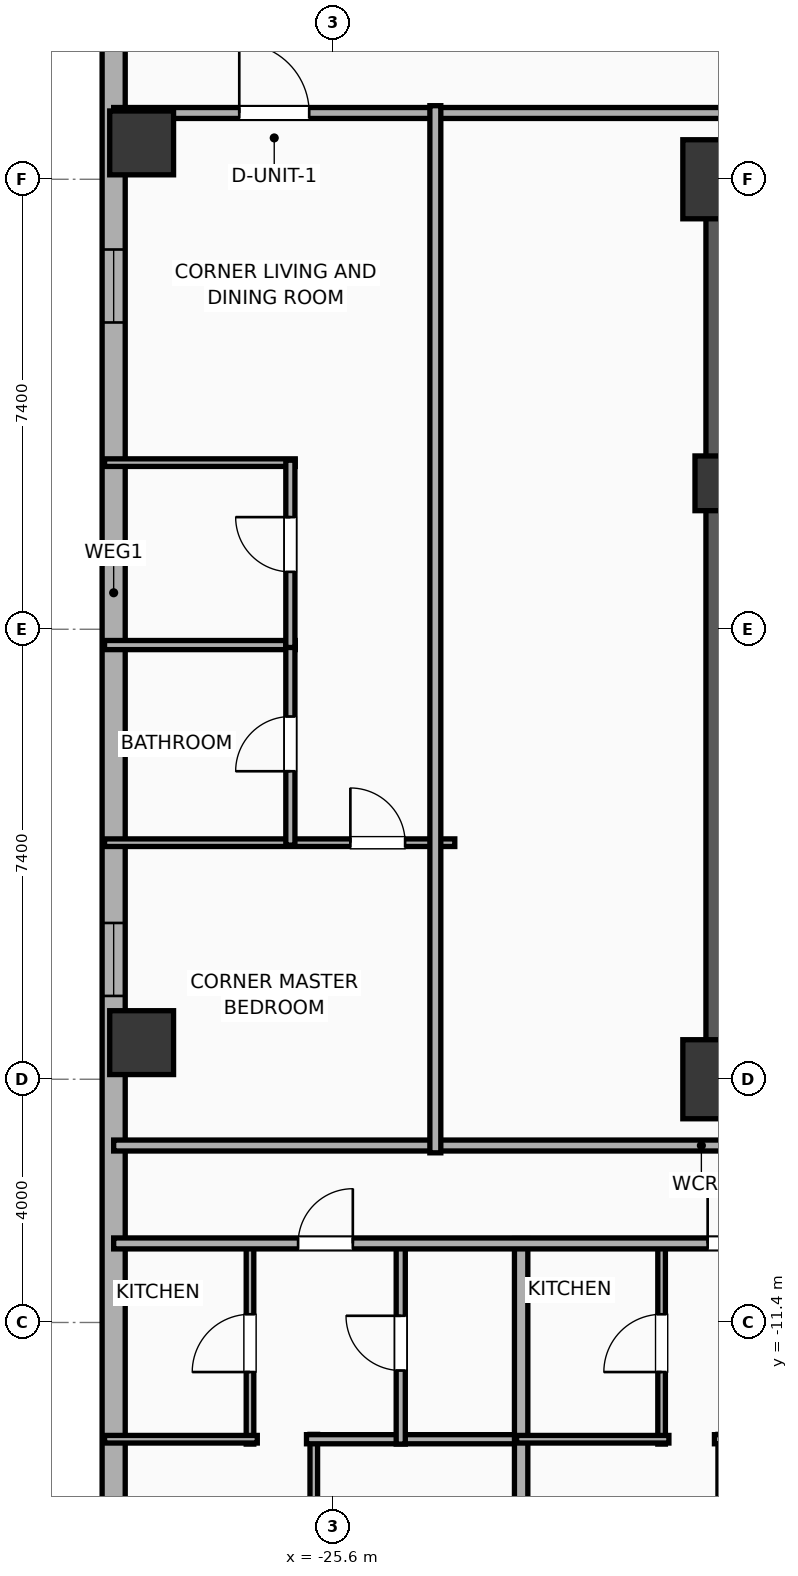
"""IFC4 building model, lengths in metres.
Left out: names, types, materials, properties, quantities, classifications, styles, units other than length and angle.
Written with IfcOpenShell. Run it as: python <this file> out.ifc"""

import sys

from ifc_helpers import new_model, si_unit, direction, frame, frame_2d, origin, origin_2d, place, context, subcontext, project, spatial, rectangle, hollow_rectangle, extrude, element, fill, save


model = new_model("IFC4")
c1 = context("Model", 3, precision=1e-05, world=origin(), true_north=direction((0.0, 1.0)))
c2 = subcontext(c1, "Body", "Model", "MODEL_VIEW")
j1 = project(units=[si_unit("LENGTHUNIT", "METRE"), si_unit("PLANEANGLEUNIT", "RADIAN")], contexts=[c1])
p1 = place(None, origin())
s1 = spatial("IfcSite", under=j1, at=p1, CompositionType="ELEMENT")
p2 = place(p1, origin())
s2 = spatial("IfcBuilding", under=s1, at=p2, CompositionType="ELEMENT")
p3 = place(p2, frame((0.0, 0.0, 97.5)))
s3 = spatial("IfcBuildingStorey", under=s2, at=p3, CompositionType="ELEMENT", Elevation=97.5)
p4 = place(p3, frame((-19.2, -7.4, 0.0), z_axis=(0.0, 0.0, 1.0), x_axis=(1.0, 0.0, 0.0)))
e1 = element("IfcColumn", 1, at=p4, inside=s3, PredefinedType="COLUMN", context=c2, shape_type="SweptSolid", body=[
    extrude(rectangle(XDim=1.3, YDim=1.3, at=origin_2d()), origin(), (0.0, 0.0, 1.0), 3.9),
])
p5 = place(p3, frame((-19.2, 2.4, 0.0), z_axis=(0.0, 0.0, 1.0), x_axis=(1.0, 0.0, 0.0)))
e2 = element("IfcColumn", 2, at=p5, inside=s3, PredefinedType="COLUMN", context=c2, shape_type="SweptSolid", body=[
    extrude(rectangle(XDim=0.9, YDim=0.9, at=origin_2d()), origin(), (0.0, 0.0, 1.0), 3.9),
])
p6 = place(p3, frame((-19.2, 7.4, 0.0), z_axis=(0.0, 0.0, 1.0), x_axis=(1.0, 0.0, 0.0)))
e3 = element("IfcColumn", 3, at=p6, inside=s3, PredefinedType="COLUMN", context=c2, shape_type="SweptSolid", body=[
    extrude(rectangle(XDim=1.3, YDim=1.3, at=origin_2d()), origin(), (0.0, 0.0, 1.0), 3.9),
])
for number, where, z_axis, x_axis in (
    (4, (-19.475, -7.4, 0.0), (0.0, 0.0, 1.0), (1.0, 0.0, 0.0)),
    (5, (-19.475, 7.4, 0.0), (0.0, 0.0, 1.0), (1.0, 0.0, 0.0)),
):
    element("IfcWall", number, at=place(p3, frame(where, z_axis=z_axis, x_axis=x_axis)), inside=s3, PredefinedType="SHEAR", context=c2, shape_type="SweptSolid", body=[
        extrude(rectangle(XDim=7.35, YDim=0.55, at=frame_2d((3.675, 0.0))), origin(), (0.0, 0.0, 1.0), 3.65),
    ])
p7 = place(p3, frame((-19.145, -7.4, 0.0), z_axis=(0.0, 0.0, 1.0), x_axis=(0.0, 1.0, 0.0)))
e6 = element("IfcWall", 6, at=p7, inside=s3, PredefinedType="SHEAR", context=c2, shape_type="SweptSolid", body=[
    extrude(rectangle(XDim=14.8, YDim=0.65, at=frame_2d((7.4, 0.0))), origin(), (0.0, 0.0, 1.0), 3.65),
])
for number, where, z_axis, x_axis in (
    (7, (-28.75, 7.998, 0.0), (0.0, 0.0, 1.0), (1.0, 0.0, 0.0)),
    (8, (-28.75, -6.798, 0.0), (0.0, 0.0, 1.0), (1.0, 0.0, 0.0)),
):
    element("IfcColumn", number, at=place(p3, frame(where, z_axis=z_axis, x_axis=x_axis)), inside=s3, PredefinedType="COLUMN", context=c2, shape_type="SweptSolid", body=[
        extrude(hollow_rectangle(XDim=1.05, YDim=1.05, WallThickness=0.036, at=origin_2d()), origin(), (0.0, 0.0, 1.0), 3.9),
    ])
p8 = place(p3, frame((-29.21, -16.581, 0.0), z_axis=(0.0, 0.0, 1.0), x_axis=(0.0, 1.0, 0.0)))
e9 = element("IfcWall", 9, at=p8, inside=s3, PredefinedType="ELEMENTEDWALL", context=c2, shape_type="SweptSolid", body=[
    extrude(rectangle(XDim=34.363, YDim=0.38, at=frame_2d((17.181, 0.0))), origin(), (0.0, 0.0, 1.0), 3.65),
])
p9 = place(p8, frame((31.087, 0.0, 0.75)))
e10 = element("IfcOpeningElement", 10, at=p9, cuts=e9, PredefinedType="OPENING", context=c2, shape_type="SweptSolid", body=[
    extrude(rectangle(XDim=1.2, YDim=2.05, at=frame_2d((0.6, 1.025))), frame((0.0, 0.2, 0.0), z_axis=(0.0, -1.0, 0.0), x_axis=(1.0, 0.0, 0.0)), (0.0, 0.0, 1.0), 0.4),
])
p10 = place(p8, frame((21.626, 0.0, 0.75)))
e11 = element("IfcOpeningElement", 11, at=p10, cuts=e9, PredefinedType="OPENING", context=c2, shape_type="SweptSolid", body=[
    extrude(rectangle(XDim=1.2, YDim=2.05, at=frame_2d((0.6, 1.025))), frame((0.0, 0.2, 0.0), z_axis=(0.0, -1.0, 0.0), x_axis=(1.0, 0.0, 0.0)), (0.0, 0.0, 1.0), 0.4),
])
p11 = place(p8, frame((10.551, 0.0, 0.75)))
e12 = element("IfcOpeningElement", 12, at=p11, cuts=e9, PredefinedType="OPENING", context=c2, shape_type="SweptSolid", body=[
    extrude(rectangle(XDim=1.2, YDim=2.05, at=frame_2d((0.6, 1.025))), frame((0.0, 0.2, 0.0), z_axis=(0.0, -1.0, 0.0), x_axis=(1.0, 0.0, 0.0)), (0.0, 0.0, 1.0), 0.4),
])
p12 = place(p3, frame((-29.21, 8.49, 0.0), z_axis=(0.0, 0.0, 1.0), x_axis=(1.0, 0.0, 0.0)))
e13 = element("IfcWall", 13, at=p12, inside=s3, PredefinedType="PARTITIONING", context=c2, shape_type="SweptSolid", body=[
    extrude(rectangle(XDim=19.33, YDim=0.18, at=frame_2d((9.665, 0.0))), origin(), (0.0, 0.0, 1.0), 3.65),
])
p13 = place(p12, frame((2.065, 0.0, 0.0)))
e14 = element("IfcOpeningElement", 14, at=p13, cuts=e13, PredefinedType="OPENING", context=c2, shape_type="SweptSolid", body=[
    extrude(rectangle(XDim=1.15, YDim=2.05, at=frame_2d((0.575, 1.025))), frame((0.0, 0.1, 0.0), z_axis=(0.0, -1.0, 0.0), x_axis=(1.0, 0.0, 0.0)), (0.0, 0.0, 1.0), 0.2),
])
p14 = place(p3, frame((-29.21, -8.49, 0.0), z_axis=(0.0, 0.0, 1.0), x_axis=(1.0, 0.0, 0.0)))
e15 = element("IfcWall", 15, at=p14, inside=s3, PredefinedType="PARTITIONING", context=c2, shape_type="SweptSolid", body=[
    extrude(rectangle(XDim=19.33, YDim=0.18, at=frame_2d((9.665, 0.0))), origin(), (0.0, 0.0, 1.0), 3.65),
])
p15 = place(p3, frame((-25.919, -20.456, 0.0), z_axis=(0.0, 0.0, 1.0), x_axis=(0.0, 1.0, 0.0)))
e16 = element("IfcWall", 16, at=p15, inside=s3, PredefinedType="PARTITIONING", context=c2, shape_type="SweptSolid", body=[
    extrude(rectangle(XDim=7.216, YDim=0.125, at=frame_2d((3.608, 0.0))), origin(), (0.0, 0.0, 1.0), 3.65),
])
p16 = place(p15, frame((5.034, 0.0, 0.0)))
e17 = element("IfcOpeningElement", 17, at=p16, cuts=e16, PredefinedType="OPENING", context=c2, shape_type="SweptSolid", body=[
    extrude(rectangle(XDim=0.9, YDim=2.05, at=frame_2d((0.45, 1.025))), frame((0.0, 0.073, 0.0), z_axis=(0.0, -1.0, 0.0), x_axis=(1.0, 0.0, 0.0)), (0.0, 0.0, 1.0), 0.145),
])
p17 = place(p3, frame((-26.039, -13.32, 0.0), z_axis=(0.0, 0.0, 1.0), x_axis=(1.0, 0.0, 0.0)))
e18 = element("IfcWall", 18, at=p17, inside=s3, PredefinedType="PLUMBINGWALL", context=c2, shape_type="SweptSolid", body=[
    extrude(rectangle(XDim=3.605, YDim=0.15, at=frame_2d((1.802, 0.0))), origin(), (0.0, 0.0, 1.0), 3.65),
])
p18 = place(p3, frame((-26.968, -13.4, 0.0), z_axis=(0.0, 0.0, 1.0), x_axis=(0.0, 1.0, 0.0)))
e19 = element("IfcWall", 19, at=p18, inside=s3, PredefinedType="PARTITIONING", context=c2, shape_type="SweptSolid", body=[
    extrude(rectangle(XDim=3.32, YDim=0.125, at=frame_2d((1.66, 0.0))), origin(), (0.0, 0.0, 1.0), 3.65),
])
p19 = place(p18, frame((1.185, 0.0, 0.0)))
e20 = element("IfcOpeningElement", 20, at=p19, cuts=e19, PredefinedType="OPENING", context=c2, shape_type="SweptSolid", body=[
    extrude(rectangle(XDim=0.95, YDim=2.05, at=frame_2d((0.475, 1.025))), frame((0.0, 0.073, 0.0), z_axis=(0.0, -1.0, 0.0), x_axis=(1.0, 0.0, 0.0)), (0.0, 0.0, 1.0), 0.145),
])
p20 = place(p3, frame((-29.36, -13.32, 0.0), z_axis=(0.0, 0.0, 1.0), x_axis=(1.0, 0.0, 0.0)))
e21 = element("IfcWall", 21, at=p20, inside=s3, PredefinedType="PARTITIONING", context=c2, shape_type="SweptSolid", body=[
    extrude(rectangle(XDim=2.512, YDim=0.125, at=frame_2d((1.256, 0.0))), origin(), (0.0, 0.0, 1.0), 3.65),
])
p21 = place(p3, frame((-24.489, -13.4, 0.0), z_axis=(0.0, 0.0, 1.0), x_axis=(0.0, 1.0, 0.0)))
e22 = element("IfcWall", 22, at=p21, inside=s3, PredefinedType="PLUMBINGWALL", context=c2, shape_type="SweptSolid", body=[
    extrude(rectangle(XDim=3.32, YDim=0.15, at=frame_2d((1.66, 0.0))), origin(), (0.0, 0.0, 1.0), 3.65),
])
p22 = place(p21, frame((1.21, 0.0, 0.0)))
e23 = element("IfcOpeningElement", 23, at=p22, cuts=e22, PredefinedType="OPENING", context=c2, shape_type="SweptSolid", body=[
    extrude(rectangle(XDim=0.9, YDim=2.05, at=frame_2d((0.45, 1.025))), frame((0.0, 0.085, 0.0), z_axis=(0.0, -1.0, 0.0), x_axis=(1.0, 0.0, 0.0)), (0.0, 0.0, 1.0), 0.17),
])
p23 = place(p3, frame((-22.509, -20.41, 0.0), z_axis=(0.0, 0.0, 1.0), x_axis=(0.0, 1.0, 0.0)))
e24 = element("IfcWall", 24, at=p23, inside=s3, PredefinedType="PARTITIONING", context=c2, shape_type="SweptSolid", body=[
    extrude(rectangle(XDim=10.39, YDim=0.22, at=frame_2d((5.195, 0.0))), origin(), (0.0, 0.0, 1.0), 3.65),
])
p24 = place(p3, frame((-19.21, -20.56, 0.0), z_axis=(0.0, 0.0, 1.0), x_axis=(0.0, 1.0, 0.0)))
e25 = element("IfcWall", 25, at=p24, inside=s3, PredefinedType="PARTITIONING", context=c2, shape_type="SweptSolid", body=[
    extrude(rectangle(XDim=7.32, YDim=0.125, at=frame_2d((3.66, 0.0))), origin(), (0.0, 0.0, 1.0), 3.65),
])
p25 = place(p24, frame((5.113, 0.0, 0.0)))
e26 = element("IfcOpeningElement", 26, at=p25, cuts=e25, PredefinedType="OPENING", context=c2, shape_type="SweptSolid", body=[
    extrude(rectangle(XDim=0.9, YDim=2.05, at=frame_2d((0.45, 1.025))), frame((0.0, 0.073, 0.0), z_axis=(0.0, -1.0, 0.0), x_axis=(1.0, 0.0, 0.0)), (0.0, 0.0, 1.0), 0.145),
])
p26 = place(p3, frame((-19.33, -13.32, 0.0), z_axis=(0.0, 0.0, 1.0), x_axis=(1.0, 0.0, 0.0)))
e27 = element("IfcWall", 27, at=p26, inside=s3, PredefinedType="PLUMBINGWALL", context=c2, shape_type="SweptSolid", body=[
    extrude(rectangle(XDim=3.79, YDim=0.15, at=frame_2d((1.895, 0.0))), origin(), (0.0, 0.0, 1.0), 3.65),
])
p27 = place(p3, frame((-20.199, -13.4, 0.0), z_axis=(0.0, 0.0, 1.0), x_axis=(0.0, 1.0, 0.0)))
e28 = element("IfcWall", 28, at=p27, inside=s3, PredefinedType="PARTITIONING", context=c2, shape_type="SweptSolid", body=[
    extrude(rectangle(XDim=3.32, YDim=0.125, at=frame_2d((1.66, 0.0))), origin(), (0.0, 0.0, 1.0), 3.65),
])
p28 = place(p27, frame((1.185, 0.0, 0.0)))
e29 = element("IfcOpeningElement", 29, at=p28, cuts=e28, PredefinedType="OPENING", context=c2, shape_type="SweptSolid", body=[
    extrude(rectangle(XDim=0.95, YDim=2.05, at=frame_2d((0.475, 1.025))), frame((0.0, 0.073, 0.0), z_axis=(0.0, -1.0, 0.0), x_axis=(1.0, 0.0, 0.0)), (0.0, 0.0, 1.0), 0.145),
])
p29 = place(p3, frame((-22.584, -13.32, 0.0), z_axis=(0.0, 0.0, 1.0), x_axis=(1.0, 0.0, 0.0)))
e30 = element("IfcWall", 30, at=p29, inside=s3, PredefinedType="PARTITIONING", context=c2, shape_type="SweptSolid", body=[
    extrude(rectangle(XDim=2.505, YDim=0.125, at=frame_2d((1.252, 0.0))), origin(), (0.0, 0.0, 1.0), 3.65),
])
p30 = place(p3, frame((-29.21, -10.1, 0.0), z_axis=(0.0, 0.0, 1.0), x_axis=(1.0, 0.0, 0.0)))
e31 = element("IfcWall", 31, at=p30, inside=s3, PredefinedType="PARTITIONING", context=c2, shape_type="SweptSolid", body=[
    extrude(rectangle(XDim=62.42, YDim=0.18, at=frame_2d((31.21, 0.0))), origin(), (0.0, 0.0, 1.0), 3.65),
])
p31 = place(p30, frame((3.033, 0.0, 0.0)))
e32 = element("IfcOpeningElement", 32, at=p31, cuts=e31, PredefinedType="OPENING", context=c2, shape_type="SweptSolid", body=[
    extrude(rectangle(XDim=0.9, YDim=2.05, at=frame_2d((0.45, 1.025))), frame((0.0, 0.1, 0.0), z_axis=(0.0, -1.0, 0.0), x_axis=(1.0, 0.0, 0.0)), (0.0, 0.0, 1.0), 0.2),
])
p32 = place(p30, frame((9.768, 0.0, 0.0)))
e33 = element("IfcOpeningElement", 33, at=p32, cuts=e31, PredefinedType="OPENING", context=c2, shape_type="SweptSolid", body=[
    extrude(rectangle(XDim=0.9, YDim=2.05, at=frame_2d((0.45, 1.025))), frame((0.0, 0.1, 0.0), z_axis=(0.0, -1.0, 0.0), x_axis=(1.0, 0.0, 0.0)), (0.0, 0.0, 1.0), 0.2),
])
p33 = place(p30, frame((18.65, 0.0, 0.0)))
e34 = element("IfcOpeningElement", 34, at=p33, cuts=e31, PredefinedType="OPENING", context=c2, shape_type="SweptSolid", body=[
    extrude(rectangle(XDim=1.15, YDim=2.05, at=frame_2d((0.575, 1.025))), frame((0.0, 0.1, 0.0), z_axis=(0.0, -1.0, 0.0), x_axis=(1.0, 0.0, 0.0)), (0.0, 0.0, 1.0), 0.2),
])
p34 = place(p30, frame((29.212, 0.0, 0.0)))
e35 = element("IfcOpeningElement", 35, at=p34, cuts=e31, PredefinedType="OPENING", context=c2, shape_type="SweptSolid", body=[
    extrude(rectangle(XDim=1.15, YDim=2.05, at=frame_2d((0.575, 1.025))), frame((0.0, 0.1, 0.0), z_axis=(0.0, -1.0, 0.0), x_axis=(1.0, 0.0, 0.0)), (0.0, 0.0, 1.0), 0.2),
])
p35 = place(p30, frame((40.379, 0.0, 0.0)))
e36 = element("IfcOpeningElement", 36, at=p35, cuts=e31, PredefinedType="OPENING", context=c2, shape_type="SweptSolid", body=[
    extrude(rectangle(XDim=1.15, YDim=2.05, at=frame_2d((0.575, 1.025))), frame((0.0, 0.1, 0.0), z_axis=(0.0, -1.0, 0.0), x_axis=(1.0, 0.0, 0.0)), (0.0, 0.0, 1.0), 0.2),
])
p36 = place(p30, frame((50.959, 0.0, 0.0)))
e37 = element("IfcOpeningElement", 37, at=p36, cuts=e31, PredefinedType="OPENING", context=c2, shape_type="SweptSolid", body=[
    extrude(rectangle(XDim=1.15, YDim=2.05, at=frame_2d((0.575, 1.025))), frame((0.0, 0.1, 0.0), z_axis=(0.0, -1.0, 0.0), x_axis=(1.0, 0.0, 0.0)), (0.0, 0.0, 1.0), 0.2),
])
p37 = place(p30, frame((59.117, 0.0, 0.0)))
e38 = element("IfcOpeningElement", 38, at=p37, cuts=e31, PredefinedType="OPENING", context=c2, shape_type="SweptSolid", body=[
    extrude(rectangle(XDim=0.9, YDim=2.05, at=frame_2d((0.45, 1.025))), frame((0.0, 0.1, 0.0), z_axis=(0.0, -1.0, 0.0), x_axis=(1.0, 0.0, 0.0)), (0.0, 0.0, 1.0), 0.2),
])
p38 = place(p3, frame((-29.36, 2.74, 0.0), z_axis=(0.0, 0.0, 1.0), x_axis=(1.0, 0.0, 0.0)))
e39 = element("IfcWall", 39, at=p38, inside=s3, PredefinedType="PARTITIONING", context=c2, shape_type="SweptSolid", body=[
    extrude(rectangle(XDim=3.136, YDim=0.125, at=frame_2d((1.568, 0.0))), origin(), (0.0, 0.0, 1.0), 3.65),
])
p39 = place(p3, frame((-29.36, -0.26, 0.0), z_axis=(0.0, 0.0, 1.0), x_axis=(1.0, 0.0, 0.0)))
e40 = element("IfcWall", 40, at=p39, inside=s3, PredefinedType="PLUMBINGWALL", context=c2, shape_type="SweptSolid", body=[
    extrude(rectangle(XDim=3.136, YDim=0.15, at=frame_2d((1.568, 0.0))), origin(), (0.0, 0.0, 1.0), 3.65),
])
p40 = place(p3, frame((-29.36, -3.51, 0.0), z_axis=(0.0, 0.0, 1.0), x_axis=(1.0, 0.0, 0.0)))
e41 = element("IfcWall", 41, at=p40, inside=s3, PredefinedType="PARTITIONING", context=c2, shape_type="SweptSolid", body=[
    extrude(rectangle(XDim=5.76, YDim=0.125, at=frame_2d((2.88, 0.0))), origin(), (0.0, 0.0, 1.0), 3.65),
])
p41 = place(p40, frame((4.043, 0.0, 0.0)))
e42 = element("IfcOpeningElement", 42, at=p41, cuts=e41, PredefinedType="OPENING", context=c2, shape_type="SweptSolid", body=[
    extrude(rectangle(XDim=0.9, YDim=2.05, at=frame_2d((0.45, 1.025))), frame((0.0, 0.073, 0.0), z_axis=(0.0, -1.0, 0.0), x_axis=(1.0, 0.0, 0.0)), (0.0, 0.0, 1.0), 0.145),
])
p42 = place(p3, frame((-26.304, -3.55, 0.0), z_axis=(0.0, 0.0, 1.0), x_axis=(0.0, 1.0, 0.0)))
e43 = element("IfcWall", 43, at=p42, inside=s3, PredefinedType="PLUMBINGWALL", context=c2, shape_type="SweptSolid", body=[
    extrude(rectangle(XDim=3.33, YDim=0.15, at=frame_2d((1.665, 0.0))), origin(), (0.0, 0.0, 1.0), 3.65),
])
p43 = place(p42, frame((1.215, 0.0, 0.0)))
e44 = element("IfcOpeningElement", 44, at=p43, cuts=e43, PredefinedType="OPENING", context=c2, shape_type="SweptSolid", body=[
    extrude(rectangle(XDim=0.9, YDim=2.05, at=frame_2d((0.45, 1.025))), frame((0.0, 0.085, 0.0), z_axis=(0.0, -1.0, 0.0), x_axis=(1.0, 0.0, 0.0)), (0.0, 0.0, 1.0), 0.17),
])
p44 = place(p3, frame((-26.304, -0.3, 0.0), z_axis=(0.0, 0.0, 1.0), x_axis=(0.0, 1.0, 0.0)))
e45 = element("IfcWall", 45, at=p44, inside=s3, PredefinedType="PLUMBINGWALL", context=c2, shape_type="SweptSolid", body=[
    extrude(rectangle(XDim=3.08, YDim=0.15, at=frame_2d((1.54, 0.0))), origin(), (0.0, 0.0, 1.0), 3.65),
])
p45 = place(p44, frame((1.244, 0.0, 0.0)))
e46 = element("IfcOpeningElement", 46, at=p45, cuts=e45, PredefinedType="OPENING", context=c2, shape_type="SweptSolid", body=[
    extrude(rectangle(XDim=0.9, YDim=2.05, at=frame_2d((0.45, 1.025))), frame((0.0, 0.085, 0.0), z_axis=(0.0, -1.0, 0.0), x_axis=(1.0, 0.0, 0.0)), (0.0, 0.0, 1.0), 0.17),
])
p46 = place(p3, frame((-23.92, -8.61, 0.0), z_axis=(0.0, 0.0, 1.0), x_axis=(0.0, 1.0, 0.0)))
e47 = element("IfcWall", 47, at=p46, inside=s3, PredefinedType="PARTITIONING", context=c2, shape_type="SweptSolid", body=[
    extrude(rectangle(XDim=17.22, YDim=0.18, at=frame_2d((8.61, 0.0))), origin(), (0.0, 0.0, 1.0), 3.65),
])
p47 = place(p10, origin())
e48 = element("IfcWindow", 48, at=p47, inside=s3, PartitioningType="SINGLE_PANEL", PredefinedType="WINDOW", context=c2, shape_type="SweptSolid", body=[
    extrude(rectangle(XDim=1.2, YDim=2.05, at=frame_2d((0.6, 1.025))), frame((0.0, 0.03, 0.0), z_axis=(0.0, -1.0, 0.0), x_axis=(1.0, 0.0, 0.0)), (0.0, 0.0, 1.0), 0.06),
])
fill(e11, e48)
p48 = place(p11, origin())
e49 = element("IfcWindow", 49, at=p48, inside=s3, PartitioningType="SINGLE_PANEL", PredefinedType="WINDOW", context=c2, shape_type="SweptSolid", body=[
    extrude(rectangle(XDim=1.2, YDim=2.05, at=frame_2d((0.6, 1.025))), frame((0.0, 0.03, 0.0), z_axis=(0.0, -1.0, 0.0), x_axis=(1.0, 0.0, 0.0)), (0.0, 0.0, 1.0), 0.06),
])
fill(e12, e49)
p49 = place(p13, origin())
e50 = element("IfcDoor", 50, at=p49, inside=s3, OperationType="SINGLE_SWING_LEFT", PredefinedType="DOOR", context=c2, shape_type="SweptSolid", body=[
    extrude(rectangle(XDim=1.15, YDim=2.05, at=frame_2d((0.575, 1.025))), frame((0.0, 0.025, 0.0), z_axis=(0.0, -1.0, 0.0), x_axis=(1.0, 0.0, 0.0)), (0.0, 0.0, 1.0), 0.05),
])
fill(e14, e50)
p50 = place(p19, origin())
e51 = element("IfcDoor", 51, at=p50, inside=s3, OperationType="SINGLE_SWING_LEFT", PredefinedType="DOOR", context=c2, shape_type="SweptSolid", body=[
    extrude(rectangle(XDim=0.95, YDim=2.05, at=frame_2d((0.475, 1.025))), frame((0.0, 0.025, 0.0), z_axis=(0.0, -1.0, 0.0), x_axis=(1.0, 0.0, 0.0)), (0.0, 0.0, 1.0), 0.05),
])
fill(e20, e51)
p51 = place(p22, origin())
e52 = element("IfcDoor", 52, at=p51, inside=s3, OperationType="SINGLE_SWING_RIGHT", PredefinedType="DOOR", context=c2, shape_type="SweptSolid", body=[
    extrude(rectangle(XDim=0.9, YDim=2.05, at=frame_2d((0.45, 1.025))), frame((0.0, 0.025, 0.0), z_axis=(0.0, -1.0, 0.0), x_axis=(1.0, 0.0, 0.0)), (0.0, 0.0, 1.0), 0.05),
])
fill(e23, e52)
p52 = place(p28, origin())
e53 = element("IfcDoor", 53, at=p52, inside=s3, OperationType="SINGLE_SWING_LEFT", PredefinedType="DOOR", context=c2, shape_type="SweptSolid", body=[
    extrude(rectangle(XDim=0.95, YDim=2.05, at=frame_2d((0.475, 1.025))), frame((0.0, 0.025, 0.0), z_axis=(0.0, -1.0, 0.0), x_axis=(1.0, 0.0, 0.0)), (0.0, 0.0, 1.0), 0.05),
])
fill(e29, e53)
p53 = place(p31, origin())
e54 = element("IfcDoor", 54, at=p53, inside=s3, OperationType="SINGLE_SWING_RIGHT", PredefinedType="DOOR", context=c2, shape_type="SweptSolid", body=[
    extrude(rectangle(XDim=0.9, YDim=2.05, at=frame_2d((0.45, 1.025))), frame((0.0, 0.025, 0.0), z_axis=(0.0, -1.0, 0.0), x_axis=(1.0, 0.0, 0.0)), (0.0, 0.0, 1.0), 0.05),
])
fill(e32, e54)
p54 = place(p32, origin())
e55 = element("IfcDoor", 55, at=p54, inside=s3, OperationType="SINGLE_SWING_LEFT", PredefinedType="DOOR", context=c2, shape_type="SweptSolid", body=[
    extrude(rectangle(XDim=0.9, YDim=2.05, at=frame_2d((0.45, 1.025))), frame((0.0, 0.025, 0.0), z_axis=(0.0, -1.0, 0.0), x_axis=(1.0, 0.0, 0.0)), (0.0, 0.0, 1.0), 0.05),
])
fill(e33, e55)
p55 = place(p41, origin())
e56 = element("IfcDoor", 56, at=p55, inside=s3, OperationType="SINGLE_SWING_LEFT", PredefinedType="DOOR", context=c2, shape_type="SweptSolid", body=[
    extrude(rectangle(XDim=0.9, YDim=2.05, at=frame_2d((0.45, 1.025))), frame((0.0, 0.025, 0.0), z_axis=(0.0, -1.0, 0.0), x_axis=(1.0, 0.0, 0.0)), (0.0, 0.0, 1.0), 0.05),
])
fill(e42, e56)
p56 = place(p43, origin())
e57 = element("IfcDoor", 57, at=p56, inside=s3, OperationType="SINGLE_SWING_LEFT", PredefinedType="DOOR", context=c2, shape_type="SweptSolid", body=[
    extrude(rectangle(XDim=0.9, YDim=2.05, at=frame_2d((0.45, 1.025))), frame((0.0, 0.025, 0.0), z_axis=(0.0, -1.0, 0.0), x_axis=(1.0, 0.0, 0.0)), (0.0, 0.0, 1.0), 0.05),
])
fill(e44, e57)
p57 = place(p45, origin())
e58 = element("IfcDoor", 58, at=p57, inside=s3, OperationType="SINGLE_SWING_RIGHT", PredefinedType="DOOR", context=c2, shape_type="SweptSolid", body=[
    extrude(rectangle(XDim=0.9, YDim=2.05, at=frame_2d((0.45, 1.025))), frame((0.0, 0.025, 0.0), z_axis=(0.0, -1.0, 0.0), x_axis=(1.0, 0.0, 0.0)), (0.0, 0.0, 1.0), 0.05),
])
fill(e46, e58)
save(model, sys.argv[1])
